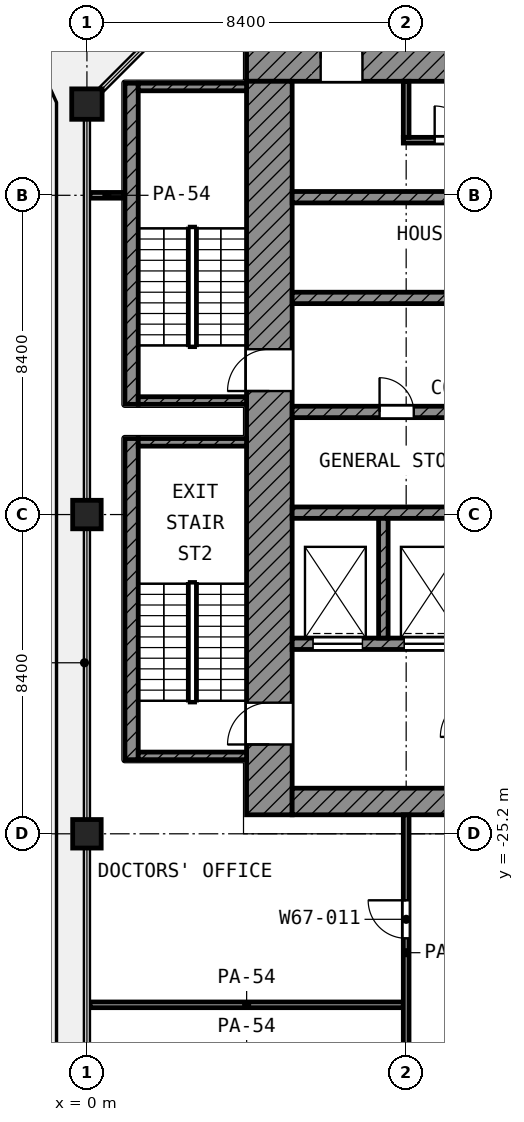
"""IFC4 building model, lengths in metres.
Left out: names, types, materials, properties, quantities, classifications, styles, units other than length and angle.
Written with IfcOpenShell. Run it as: python <this file> out.ifc"""

import sys

from ifc_helpers import new_model, si_unit, direction, frame, frame_2d, origin, origin_2d, place, context, subcontext, project, spatial, rectangle, extrude, element, fill, save


model = new_model("IFC4")
c1 = context("Model", 3, precision=1e-05, world=origin(), true_north=direction((0.0, 1.0)))
c2 = subcontext(c1, "Body", "Model", "MODEL_VIEW")
j1 = project(units=[si_unit("LENGTHUNIT", "METRE"), si_unit("PLANEANGLEUNIT", "RADIAN")], contexts=[c1])
p1 = place(None, origin())
s1 = spatial("IfcSite", under=j1, at=p1, CompositionType="ELEMENT")
p2 = place(p1, origin())
s2 = spatial("IfcBuilding", under=s1, at=p2, CompositionType="ELEMENT")
p3 = place(p2, frame((0.0, 0.0, 290.2)))
s3 = spatial("IfcBuildingStorey", under=s2, at=p3, CompositionType="ELEMENT", Elevation=290.2)
p4 = place(p3, frame((0.0, -6.0, 0.0), z_axis=(0.0, 0.0, 1.0), x_axis=(1.0, 0.0, 0.0)))
e1 = element("IfcColumn", 1, at=p4, inside=s3, PredefinedType="COLUMN", context=c2, shape_type="SweptSolid", body=[
    extrude(rectangle(XDim=0.8, YDim=0.8, at=origin_2d()), origin(), (0.0, 0.0, 1.0), 4.2),
])
for number, where, z_axis, x_axis in (
    (2, (0.0, -16.8, 0.0), (0.0, 0.0, 1.0), (1.0, 0.0, 0.0)),
    (3, (0.0, -25.2, 0.0), (0.0, 0.0, 1.0), (1.0, 0.0, 0.0)),
):
    element("IfcColumn", number, at=place(p3, frame(where, z_axis=z_axis, x_axis=x_axis)), inside=s3, PredefinedType="COLUMN", context=c2, shape_type="SweptSolid", body=[
        extrude(rectangle(XDim=0.75, YDim=0.75, at=origin_2d()), origin(), (0.0, 0.0, 1.0), 4.2),
    ])
p5 = place(p3, frame((4.2, -4.8, 0.0), z_axis=(0.0, 0.0, 1.0), x_axis=(1.0, 0.0, 0.0)))
e4 = element("IfcWall", 4, at=p5, inside=s3, PredefinedType="SHEAR", context=c2, shape_type="SweptSolid", body=[
    extrude(rectangle(XDim=20.5, YDim=1.2, at=frame_2d((10.25, 0.0))), origin(), (0.0, 0.0, 1.0), 3.6),
])
p6 = place(p5, frame((1.95, 0.0, 0.0)))
e5 = element("IfcOpeningElement", 5, at=p6, cuts=e4, PredefinedType="OPENING", context=c2, shape_type="SweptSolid", body=[
    extrude(rectangle(XDim=1.1, YDim=2.1, at=frame_2d((0.55, 1.05))), frame((0.0, 0.61, 0.0), z_axis=(0.0, -1.0, 0.0), x_axis=(1.0, 0.0, 0.0)), (0.0, 0.0, 1.0), 1.22),
])
p7 = place(p5, frame((17.95, 0.0, 0.0)))
e6 = element("IfcOpeningElement", 6, at=p7, cuts=e4, PredefinedType="OPENING", context=c2, shape_type="SweptSolid", body=[
    extrude(rectangle(XDim=1.1, YDim=2.1, at=frame_2d((0.55, 1.05))), frame((0.0, 0.61, 0.0), z_axis=(0.0, -1.0, 0.0), x_axis=(1.0, 0.0, 0.0)), (0.0, 0.0, 1.0), 1.22),
])
p8 = place(p3, frame((4.8, -24.7, 0.0), z_axis=(0.0, 0.0, 1.0), x_axis=(0.0, 1.0, 0.0)))
e7 = element("IfcWall", 7, at=p8, inside=s3, PredefinedType="SHEAR", context=c2, shape_type="SweptSolid", body=[
    extrude(rectangle(XDim=19.3, YDim=1.2, at=frame_2d((9.65, 0.0))), origin(), (0.0, 0.0, 1.0), 3.6),
])
p9 = place(p8, frame((11.15, 0.0, 0.0)))
e8 = element("IfcOpeningElement", 8, at=p9, cuts=e7, PredefinedType="OPENING", context=c2, shape_type="SweptSolid", body=[
    extrude(rectangle(XDim=1.1, YDim=2.1, at=frame_2d((0.55, 1.05))), frame((0.0, 0.61, 0.0), z_axis=(0.0, -1.0, 0.0), x_axis=(1.0, 0.0, 0.0)), (0.0, 0.0, 1.0), 1.22),
])
p10 = place(p8, frame((1.85, 0.0, 0.0)))
e9 = element("IfcOpeningElement", 9, at=p10, cuts=e7, PredefinedType="OPENING", context=c2, shape_type="SweptSolid", body=[
    extrude(rectangle(XDim=1.1, YDim=2.1, at=frame_2d((0.55, 1.05))), frame((0.0, 0.61, 0.0), z_axis=(0.0, -1.0, 0.0), x_axis=(1.0, 0.0, 0.0)), (0.0, 0.0, 1.0), 1.22),
])
p11 = place(p3, frame((5.4, -24.35, 0.0), z_axis=(0.0, 0.0, 1.0), x_axis=(1.0, 0.0, 0.0)))
e10 = element("IfcWall", 10, at=p11, inside=s3, PredefinedType="SHEAR", context=c2, shape_type="SweptSolid", body=[
    extrude(rectangle(XDim=18.6, YDim=0.7, at=frame_2d((9.3, 0.0))), origin(), (0.0, 0.0, 1.0), 3.6),
])
p12 = place(p11, frame((6.3, 0.0, 0.0)))
e11 = element("IfcOpeningElement", 11, at=p12, cuts=e10, PredefinedType="OPENING", context=c2, shape_type="SweptSolid", body=[
    extrude(rectangle(XDim=1.8, YDim=2.1, at=frame_2d((0.9, 1.05))), frame((0.0, 0.36, 0.0), z_axis=(0.0, -1.0, 0.0), x_axis=(1.0, 0.0, 0.0)), (0.0, 0.0, 1.0), 0.72),
])
p13 = place(p3, frame((5.4, -8.45, 0.0), z_axis=(0.0, 0.0, 1.0), x_axis=(1.0, 0.0, 0.0)))
e12 = element("IfcWall", 12, at=p13, inside=s3, PredefinedType="SHEAR", context=c2, shape_type="SweptSolid", body=[
    extrude(rectangle(XDim=16.65, YDim=0.3, at=frame_2d((8.325, 0.0))), origin(), (0.0, 0.0, 1.0), 3.6),
])
p14 = place(p3, frame((5.4, -11.1, 0.0), z_axis=(0.0, 0.0, 1.0), x_axis=(1.0, 0.0, 0.0)))
e13 = element("IfcWall", 13, at=p14, inside=s3, PredefinedType="SHEAR", context=c2, shape_type="SweptSolid", body=[
    extrude(rectangle(XDim=16.65, YDim=0.3, at=frame_2d((8.325, 0.0))), origin(), (0.0, 0.0, 1.0), 3.6),
])
p15 = place(p14, frame((5.05, 0.0, 0.0)))
e14 = element("IfcOpeningElement", 14, at=p15, cuts=e13, PredefinedType="OPENING", context=c2, shape_type="SweptSolid", body=[
    extrude(rectangle(XDim=0.9, YDim=2.1, at=frame_2d((0.45, 1.05))), frame((0.0, 0.16, 0.0), z_axis=(0.0, -1.0, 0.0), x_axis=(1.0, 0.0, 0.0)), (0.0, 0.0, 1.0), 0.32),
])
p16 = place(p14, frame((13.3, 0.0, 0.0)))
e15 = element("IfcOpeningElement", 15, at=p16, cuts=e13, PredefinedType="OPENING", context=c2, shape_type="SweptSolid", body=[
    extrude(rectangle(XDim=0.9, YDim=2.1, at=frame_2d((0.45, 1.05))), frame((0.0, 0.16, 0.0), z_axis=(0.0, -1.0, 0.0), x_axis=(1.0, 0.0, 0.0)), (0.0, 0.0, 1.0), 0.32),
])
p17 = place(p3, frame((5.4, -14.1, 0.0), z_axis=(0.0, 0.0, 1.0), x_axis=(1.0, 0.0, 0.0)))
e16 = element("IfcWall", 16, at=p17, inside=s3, PredefinedType="SHEAR", context=c2, shape_type="SweptSolid", body=[
    extrude(rectangle(XDim=16.65, YDim=0.3, at=frame_2d((8.325, 0.0))), origin(), (0.0, 0.0, 1.0), 3.6),
])
p18 = place(p17, frame((6.325, 0.0, 0.0)))
e17 = element("IfcOpeningElement", 17, at=p18, cuts=e16, PredefinedType="OPENING", context=c2, shape_type="SweptSolid", body=[
    extrude(rectangle(XDim=1.1, YDim=2.1, at=frame_2d((0.55, 1.05))), frame((0.0, 0.16, 0.0), z_axis=(0.0, -1.0, 0.0), x_axis=(1.0, 0.0, 0.0)), (0.0, 0.0, 1.0), 0.32),
])
p19 = place(p17, frame((9.075, 0.0, 0.0)))
e18 = element("IfcOpeningElement", 18, at=p19, cuts=e16, PredefinedType="OPENING", context=c2, shape_type="SweptSolid", body=[
    extrude(rectangle(XDim=1.1, YDim=2.1, at=frame_2d((0.55, 1.05))), frame((0.0, 0.16, 0.0), z_axis=(0.0, -1.0, 0.0), x_axis=(1.0, 0.0, 0.0)), (0.0, 0.0, 1.0), 0.32),
])
p20 = place(p17, frame((11.825, 0.0, 0.0)))
e19 = element("IfcOpeningElement", 19, at=p20, cuts=e16, PredefinedType="OPENING", context=c2, shape_type="SweptSolid", body=[
    extrude(rectangle(XDim=1.1, YDim=2.1, at=frame_2d((0.55, 1.05))), frame((0.0, 0.16, 0.0), z_axis=(0.0, -1.0, 0.0), x_axis=(1.0, 0.0, 0.0)), (0.0, 0.0, 1.0), 0.32),
])
p21 = place(p17, frame((14.575, 0.0, 0.0)))
e20 = element("IfcOpeningElement", 20, at=p21, cuts=e16, PredefinedType="OPENING", context=c2, shape_type="SweptSolid", body=[
    extrude(rectangle(XDim=1.1, YDim=2.1, at=frame_2d((0.55, 1.05))), frame((0.0, 0.16, 0.0), z_axis=(0.0, -1.0, 0.0), x_axis=(1.0, 0.0, 0.0)), (0.0, 0.0, 1.0), 0.32),
])
p22 = place(p17, frame((2.3, 0.0, 0.0)))
e21 = element("IfcOpeningElement", 21, at=p22, cuts=e16, PredefinedType="OPENING", context=c2, shape_type="SweptSolid", body=[
    extrude(rectangle(XDim=0.9, YDim=2.1, at=frame_2d((0.45, 1.05))), frame((0.0, 0.16, 0.0), z_axis=(0.0, -1.0, 0.0), x_axis=(1.0, 0.0, 0.0)), (0.0, 0.0, 1.0), 0.32),
])
p23 = place(p3, frame((5.4, -16.75, 0.0), z_axis=(0.0, 0.0, 1.0), x_axis=(1.0, 0.0, 0.0)))
e22 = element("IfcWall", 22, at=p23, inside=s3, PredefinedType="SHEAR", context=c2, shape_type="SweptSolid", body=[
    extrude(rectangle(XDim=16.65, YDim=0.3, at=frame_2d((8.325, 0.0))), origin(), (0.0, 0.0, 1.0), 3.6),
])
p24 = place(p3, frame((5.4, -20.2, 0.0), z_axis=(0.0, 0.0, 1.0), x_axis=(1.0, 0.0, 0.0)))
e23 = element("IfcWall", 23, at=p24, inside=s3, PredefinedType="SHEAR", context=c2, shape_type="SweptSolid", body=[
    extrude(rectangle(XDim=14.65, YDim=0.3, at=frame_2d((7.325, 0.0))), origin(), (0.0, 0.0, 1.0), 3.6),
])
p25 = place(p24, frame((10.55, 0.0, 0.0)))
e24 = element("IfcOpeningElement", 24, at=p25, cuts=e23, PredefinedType="OPENING", context=c2, shape_type="SweptSolid", body=[
    extrude(rectangle(XDim=1.3, YDim=2.1, at=frame_2d((0.65, 1.05))), frame((0.0, 0.16, 0.0), z_axis=(0.0, -1.0, 0.0), x_axis=(1.0, 0.0, 0.0)), (0.0, 0.0, 1.0), 0.32),
])
p26 = place(p24, frame((12.95, 0.0, 0.0)))
e25 = element("IfcOpeningElement", 25, at=p26, cuts=e23, PredefinedType="OPENING", context=c2, shape_type="SweptSolid", body=[
    extrude(rectangle(XDim=1.3, YDim=2.1, at=frame_2d((0.65, 1.05))), frame((0.0, 0.16, 0.0), z_axis=(0.0, -1.0, 0.0), x_axis=(1.0, 0.0, 0.0)), (0.0, 0.0, 1.0), 0.32),
])
p27 = place(p24, frame((0.55, 0.0, 0.0)))
e26 = element("IfcOpeningElement", 26, at=p27, cuts=e23, PredefinedType="OPENING", context=c2, shape_type="SweptSolid", body=[
    extrude(rectangle(XDim=1.3, YDim=2.1, at=frame_2d((0.65, 1.05))), frame((0.0, 0.16, 0.0), z_axis=(0.0, -1.0, 0.0), x_axis=(1.0, 0.0, 0.0)), (0.0, 0.0, 1.0), 0.32),
])
p28 = place(p24, frame((2.95, 0.0, 0.0)))
e27 = element("IfcOpeningElement", 27, at=p28, cuts=e23, PredefinedType="OPENING", context=c2, shape_type="SweptSolid", body=[
    extrude(rectangle(XDim=1.3, YDim=2.1, at=frame_2d((0.65, 1.05))), frame((0.0, 0.16, 0.0), z_axis=(0.0, -1.0, 0.0), x_axis=(1.0, 0.0, 0.0)), (0.0, 0.0, 1.0), 0.32),
])
p29 = place(p24, frame((7.15, 0.0, 0.0)))
e28 = element("IfcOpeningElement", 28, at=p29, cuts=e23, PredefinedType="OPENING", context=c2, shape_type="SweptSolid", body=[
    extrude(rectangle(XDim=0.9, YDim=2.1, at=frame_2d((0.45, 1.05))), frame((0.0, 0.16, 0.0), z_axis=(0.0, -1.0, 0.0), x_axis=(1.0, 0.0, 0.0)), (0.0, 0.0, 1.0), 0.32),
])
p30 = place(p3, frame((7.8, -20.05, 0.0), z_axis=(0.0, 0.0, 1.0), x_axis=(0.0, 1.0, 0.0)))
e29 = element("IfcWall", 29, at=p30, inside=s3, PredefinedType="SHEAR", context=c2, shape_type="SweptSolid", body=[
    extrude(rectangle(XDim=3.15, YDim=0.25, at=frame_2d((1.575, 0.0))), origin(), (0.0, 0.0, 1.0), 3.6),
])
p31 = place(p3, frame((8.325, -6.95, 0.0), z_axis=(0.0, 0.0, 1.0), x_axis=(1.0, 0.0, 0.0)))
e30 = element("IfcWall", 30, at=p31, inside=s3, PredefinedType="PARTITIONING", context=c2, shape_type="SweptSolid", body=[
    extrude(rectangle(XDim=6.45, YDim=0.15, at=frame_2d((3.225, 0.0))), origin(), (0.0, 0.0, 1.0), 3.6),
])
p32 = place(p31, frame((0.825, 0.0, 0.0)))
e31 = element("IfcOpeningElement", 31, at=p32, cuts=e30, PredefinedType="OPENING", context=c2, shape_type="SweptSolid", body=[
    extrude(rectangle(XDim=0.9, YDim=2.1, at=frame_2d((0.45, 1.05))), frame((0.0, 0.085, 0.0), z_axis=(0.0, -1.0, 0.0), x_axis=(1.0, 0.0, 0.0)), (0.0, 0.0, 1.0), 0.17),
])
p33 = place(p31, frame((2.625, 0.0, 0.0)))
e32 = element("IfcOpeningElement", 32, at=p33, cuts=e30, PredefinedType="OPENING", context=c2, shape_type="SweptSolid", body=[
    extrude(rectangle(XDim=0.9, YDim=2.1, at=frame_2d((0.45, 1.05))), frame((0.0, 0.085, 0.0), z_axis=(0.0, -1.0, 0.0), x_axis=(1.0, 0.0, 0.0)), (0.0, 0.0, 1.0), 0.17),
])
p34 = place(p31, frame((4.575, 0.0, 0.0)))
e33 = element("IfcOpeningElement", 33, at=p34, cuts=e30, PredefinedType="OPENING", context=c2, shape_type="SweptSolid", body=[
    extrude(rectangle(XDim=0.9, YDim=2.1, at=frame_2d((0.45, 1.05))), frame((0.0, 0.085, 0.0), z_axis=(0.0, -1.0, 0.0), x_axis=(1.0, 0.0, 0.0)), (0.0, 0.0, 1.0), 0.17),
])
p35 = place(p3, frame((8.4, -6.875, 0.0), z_axis=(0.0, 0.0, 1.0), x_axis=(0.0, 1.0, 0.0)))
e34 = element("IfcWall", 34, at=p35, inside=s3, PredefinedType="PARTITIONING", context=c2, shape_type="SweptSolid", body=[
    extrude(rectangle(XDim=1.475, YDim=0.15, at=frame_2d((0.738, 0.0))), origin(), (0.0, 0.0, 1.0), 3.6),
])
p36 = place(p3, frame((1.175, -13.9, 0.0), z_axis=(0.0, 0.0, 1.0), x_axis=(0.0, 1.0, 0.0)))
e35 = element("IfcWall", 35, at=p36, inside=s3, PredefinedType="SHEAR", context=c2, shape_type="SweptSolid", body=[
    extrude(rectangle(XDim=8.45, YDim=0.35, at=frame_2d((4.225, 0.0))), origin(), (0.0, 0.0, 1.0), 3.6),
])
for number, where, z_axis, x_axis in (
    (36, (1.35, -5.55, 0.0), (0.0, 0.0, 1.0), (1.0, 0.0, 0.0)),
    (37, (1.35, -13.8, 0.0), (0.0, 0.0, 1.0), (1.0, 0.0, 0.0)),
):
    element("IfcWall", number, at=place(p3, frame(where, z_axis=z_axis, x_axis=x_axis)), inside=s3, PredefinedType="SHEAR", context=c2, shape_type="SweptSolid", body=[
        extrude(rectangle(XDim=2.85, YDim=0.2, at=frame_2d((1.425, 0.0))), origin(), (0.0, 0.0, 1.0), 3.6),
    ])
p37 = place(p3, frame((1.175, -23.25, 0.0), z_axis=(0.0, 0.0, 1.0), x_axis=(0.0, 1.0, 0.0)))
e38 = element("IfcWall", 38, at=p37, inside=s3, PredefinedType="SHEAR", context=c2, shape_type="SweptSolid", body=[
    extrude(rectangle(XDim=8.45, YDim=0.35, at=frame_2d((4.225, 0.0))), origin(), (0.0, 0.0, 1.0), 3.6),
])
for number, where, z_axis, x_axis in (
    (39, (1.35, -14.9, 0.0), (0.0, 0.0, 1.0), (1.0, 0.0, 0.0)),
    (40, (1.35, -23.15, 0.0), (0.0, 0.0, 1.0), (1.0, 0.0, 0.0)),
):
    element("IfcWall", number, at=place(p3, frame(where, z_axis=z_axis, x_axis=x_axis)), inside=s3, PredefinedType="SHEAR", context=c2, shape_type="SweptSolid", body=[
        extrude(rectangle(XDim=2.85, YDim=0.2, at=frame_2d((1.425, 0.0))), origin(), (0.0, 0.0, 1.0), 3.6),
    ])
p38 = place(p3, frame((0.08, -29.7, 0.0), z_axis=(0.0, 0.0, 1.0), x_axis=(1.0, 0.0, 0.0)))
e41 = element("IfcWall", 41, at=p38, inside=s3, PredefinedType="PARTITIONING", context=c2, shape_type="SweptSolid", body=[
    extrude(rectangle(XDim=8.245, YDim=0.15, at=frame_2d((4.123, 0.0))), origin(), (0.0, 0.0, 1.0), 2.7),
])
p39 = place(p3, frame((0.08, -8.4, 0.0), z_axis=(0.0, 0.0, 1.0), x_axis=(1.0, 0.0, 0.0)))
e42 = element("IfcWall", 42, at=p39, inside=s3, PredefinedType="PARTITIONING", context=c2, shape_type="SweptSolid", body=[
    extrude(rectangle(XDim=0.89, YDim=0.15, at=frame_2d((0.445, 0.0))), origin(), (0.0, 0.0, 1.0), 2.7),
])
p40 = place(p3, frame((8.4, -31.957, 0.0), z_axis=(0.0, 0.0, 1.0), x_axis=(0.0, 1.0, 0.0)))
e43 = element("IfcWall", 43, at=p40, inside=s3, PredefinedType="PARTITIONING", context=c2, shape_type="SweptSolid", body=[
    extrude(rectangle(XDim=7.257, YDim=0.15, at=frame_2d((3.628, 0.0))), origin(), (0.0, 0.0, 1.0), 3.6),
])
p41 = place(p40, frame((4.007, 0.0, 0.0)))
e44 = element("IfcOpeningElement", 44, at=p41, cuts=e43, PredefinedType="OPENING", context=c2, shape_type="SweptSolid", body=[
    extrude(rectangle(XDim=1.0, YDim=2.1, at=frame_2d((0.5, 1.05))), frame((0.0, 0.085, 0.0), z_axis=(0.0, -1.0, 0.0), x_axis=(1.0, 0.0, 0.0)), (0.0, 0.0, 1.0), 0.17),
])
p42 = place(p27, origin())
e45 = element("IfcDoor", 45, at=p42, inside=s3, OperationType="DOUBLE_DOOR_SLIDING", PredefinedType="DOOR", context=c2, shape_type="SweptSolid", body=[
    extrude(rectangle(XDim=1.3, YDim=2.1, at=frame_2d((0.65, 1.05))), frame((0.0, 0.025, 0.0), z_axis=(0.0, -1.0, 0.0), x_axis=(1.0, 0.0, 0.0)), (0.0, 0.0, 1.0), 0.05),
])
fill(e26, e45)
p43 = place(p28, origin())
e46 = element("IfcDoor", 46, at=p43, inside=s3, OperationType="DOUBLE_DOOR_SLIDING", PredefinedType="DOOR", context=c2, shape_type="SweptSolid", body=[
    extrude(rectangle(XDim=1.3, YDim=2.1, at=frame_2d((0.65, 1.05))), frame((0.0, 0.025, 0.0), z_axis=(0.0, -1.0, 0.0), x_axis=(1.0, 0.0, 0.0)), (0.0, 0.0, 1.0), 0.05),
])
fill(e27, e46)
p44 = place(p9, origin())
e47 = element("IfcDoor", 47, at=p44, inside=s3, OperationType="SINGLE_SWING_LEFT", PredefinedType="DOOR", context=c2, shape_type="SweptSolid", body=[
    extrude(rectangle(XDim=1.1, YDim=2.1, at=frame_2d((0.55, 1.05))), frame((0.0, 0.025, 0.0), z_axis=(0.0, -1.0, 0.0), x_axis=(1.0, 0.0, 0.0)), (0.0, 0.0, 1.0), 0.05),
])
fill(e8, e47)
p45 = place(p10, origin())
e48 = element("IfcDoor", 48, at=p45, inside=s3, OperationType="SINGLE_SWING_LEFT", PredefinedType="DOOR", context=c2, shape_type="SweptSolid", body=[
    extrude(rectangle(XDim=1.1, YDim=2.1, at=frame_2d((0.55, 1.05))), frame((0.0, 0.025, 0.0), z_axis=(0.0, -1.0, 0.0), x_axis=(1.0, 0.0, 0.0)), (0.0, 0.0, 1.0), 0.05),
])
fill(e9, e48)
p46 = place(p6, origin())
e49 = element("IfcDoor", 49, at=p46, inside=s3, OperationType="SINGLE_SWING_LEFT", PredefinedType="DOOR", context=c2, shape_type="SweptSolid", body=[
    extrude(rectangle(XDim=1.1, YDim=2.1, at=frame_2d((0.55, 1.05))), frame((0.0, 0.025, 0.0), z_axis=(0.0, -1.0, 0.0), x_axis=(1.0, 0.0, 0.0)), (0.0, 0.0, 1.0), 0.05),
])
fill(e5, e49)
p47 = place(p32, origin())
e50 = element("IfcDoor", 50, at=p47, inside=s3, OperationType="SINGLE_SWING_LEFT", PredefinedType="DOOR", context=c2, shape_type="SweptSolid", body=[
    extrude(rectangle(XDim=0.9, YDim=2.1, at=frame_2d((0.45, 1.05))), frame((0.0, 0.025, 0.0), z_axis=(0.0, -1.0, 0.0), x_axis=(1.0, 0.0, 0.0)), (0.0, 0.0, 1.0), 0.05),
])
fill(e31, e50)
p48 = place(p22, origin())
e51 = element("IfcDoor", 51, at=p48, inside=s3, OperationType="SINGLE_SWING_LEFT", PredefinedType="DOOR", context=c2, shape_type="SweptSolid", body=[
    extrude(rectangle(XDim=0.9, YDim=2.1, at=frame_2d((0.45, 1.05))), frame((0.0, 0.025, 0.0), z_axis=(0.0, -1.0, 0.0), x_axis=(1.0, 0.0, 0.0)), (0.0, 0.0, 1.0), 0.05),
])
fill(e21, e51)
p49 = place(p41, origin())
e52 = element("IfcDoor", 52, at=p49, inside=s3, OperationType="SINGLE_SWING_RIGHT", PredefinedType="DOOR", context=c2, shape_type="SweptSolid", body=[
    extrude(rectangle(XDim=1.0, YDim=2.1, at=frame_2d((0.5, 1.05))), frame((0.0, 0.025, 0.0), z_axis=(0.0, -1.0, 0.0), x_axis=(1.0, 0.0, 0.0)), (0.0, 0.0, 1.0), 0.05),
])
fill(e44, e52)
save(model, sys.argv[1])
